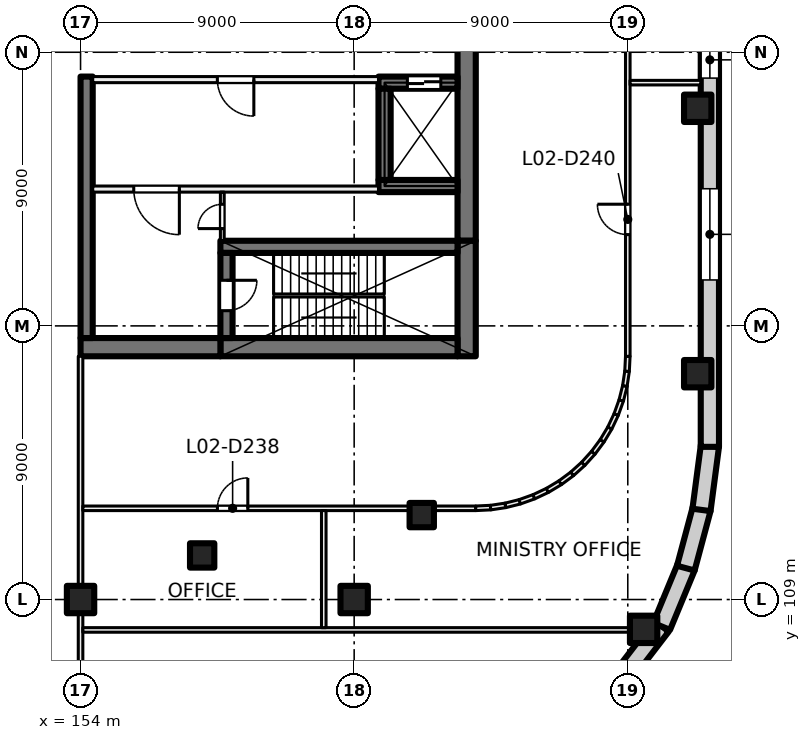
"""IFC4 building model, lengths in metres.
Left out: names, types, materials, properties, quantities, classifications, styles, units other than length and angle.
Written with IfcOpenShell. Run it as: python <this file> out.ifc"""

import sys

from ifc_helpers import new_model, si_unit, direction, frame, frame_2d, origin, origin_2d, place, context, subcontext, project, spatial, rectangle, extrude, element, fill, save


model = new_model("IFC4")
c1 = context("Model", 3, precision=1e-05, world=origin(), true_north=direction((0.0, 1.0)))
c2 = subcontext(c1, "Body", "Model", "MODEL_VIEW")
j1 = project(units=[si_unit("LENGTHUNIT", "METRE"), si_unit("PLANEANGLEUNIT", "RADIAN")], contexts=[c1])
p1 = place(None, origin())
s1 = spatial("IfcSite", under=j1, at=p1, CompositionType="ELEMENT")
p2 = place(p1, origin())
s2 = spatial("IfcBuilding", under=s1, at=p2, CompositionType="ELEMENT")
p3 = place(p2, frame((0.0, 0.0, 12.5)))
s3 = spatial("IfcBuildingStorey", under=s2, at=p3, CompositionType="ELEMENT", Elevation=12.5)
for number, where, z_axis, x_axis in (
    (1, (154.0, 109.0, 0.0), (0.0, 0.0, 1.0), (1.0, 0.0, 0.0)),
    (2, (163.0, 109.0, 0.0), (0.0, 0.0, 1.0), (1.0, 0.0, 0.0)),
    (3, (174.3, 125.157, 0.0), (0.0, 0.0, 1.0), (1.0, 0.0, 0.0)),
    (4, (174.3, 116.427, 0.0), (0.0, 0.0, 1.0), (1.0, 0.0, 0.0)),
    (5, (172.521, 108.019, 0.0), (0.0, 0.0, 1.0), (1.0, 0.0, 0.0)),
):
    element("IfcColumn", number, at=place(p3, frame(where, z_axis=z_axis, x_axis=x_axis)), inside=s3, PredefinedType="COLUMN", context=c2, shape_type="SweptSolid", body=[
        extrude(rectangle(XDim=0.9, YDim=0.9, at=origin_2d()), origin(), (0.0, 0.0, 1.0), 5.0),
    ])
for number, where, z_axis, x_axis in (
    (6, (165.223, 111.777, 0.0), (0.0, 0.0, 1.0), (1.0, 0.0, 0.0)),
    (7, (158.0, 110.45, 0.0), (0.0, 0.0, 1.0), (1.0, 0.0, 0.0)),
):
    element("IfcColumn", number, at=place(p3, frame(where, z_axis=z_axis, x_axis=x_axis)), inside=s3, PredefinedType="COLUMN", context=c2, shape_type="SweptSolid", body=[
        extrude(rectangle(XDim=0.8, YDim=0.8, at=origin_2d()), origin(), (0.0, 0.0, 1.0), 5.0),
    ])
p4 = place(p3, frame((166.7, 135.2, 0.0), z_axis=(0.0, 0.0, 1.0), x_axis=(0.0, -1.0, 0.0)))
e8 = element("IfcWall", 8, at=p4, inside=s3, PredefinedType="SHEAR", context=c2, shape_type="SweptSolid", body=[
    extrude(rectangle(XDim=14.4, YDim=0.6, at=frame_2d((7.2, 0.0))), origin(), (0.0, 0.0, 1.0), 5.0),
])
p5 = place(p3, frame((166.7, 120.8, 0.0), z_axis=(0.0, 0.0, 1.0), x_axis=(0.0, -1.0, 0.0)))
e9 = element("IfcWall", 9, at=p5, inside=s3, PredefinedType="SHEAR", context=c2, shape_type="SweptSolid", body=[
    extrude(rectangle(XDim=3.8, YDim=0.6, at=frame_2d((1.9, 0.0))), origin(), (0.0, 0.0, 1.0), 5.0),
])
p6 = place(p3, frame((166.4, 117.3, 0.0), z_axis=(0.0, 0.0, 1.0), x_axis=(-1.0, 0.0, 0.0)))
e10 = element("IfcWall", 10, at=p6, inside=s3, PredefinedType="SHEAR", context=c2, shape_type="SweptSolid", body=[
    extrude(rectangle(XDim=7.8, YDim=0.6, at=frame_2d((3.9, 0.0))), origin(), (0.0, 0.0, 1.0), 5.0),
])
p7 = place(p3, frame((158.6, 117.3, 0.0), z_axis=(0.0, 0.0, 1.0), x_axis=(-1.0, 0.0, 0.0)))
e11 = element("IfcWall", 11, at=p7, inside=s3, PredefinedType="SHEAR", context=c2, shape_type="SweptSolid", body=[
    extrude(rectangle(XDim=4.6, YDim=0.6, at=frame_2d((2.3, 0.0))), origin(), (0.0, 0.0, 1.0), 5.0),
])
p8 = place(p3, frame((166.4, 120.6, 0.0), z_axis=(0.0, 0.0, 1.0), x_axis=(-1.0, 0.0, 0.0)))
e12 = element("IfcWall", 12, at=p8, inside=s3, PredefinedType="SHEAR", context=c2, shape_type="SweptSolid", body=[
    extrude(rectangle(XDim=7.8, YDim=0.4, at=frame_2d((3.9, 0.0))), origin(), (0.0, 0.0, 1.0), 5.0),
])
p9 = place(p3, frame((158.8, 120.4, 0.0), z_axis=(0.0, 0.0, 1.0), x_axis=(0.0, -1.0, 0.0)))
e13 = element("IfcWall", 13, at=p9, inside=s3, PredefinedType="SHEAR", context=c2, shape_type="SweptSolid", body=[
    extrude(rectangle(XDim=2.8, YDim=0.4, at=frame_2d((1.4, 0.0))), origin(), (0.0, 0.0, 1.0), 5.0),
])
p10 = place(p9, frame((0.9, 0.0, 0.0)))
e14 = element("IfcOpeningElement", 14, at=p10, cuts=e13, PredefinedType="OPENING", context=c2, shape_type="SweptSolid", body=[
    extrude(rectangle(XDim=1.0, YDim=2.1, at=frame_2d((0.5, 1.05))), frame((0.0, 0.21, 0.0), z_axis=(0.0, -1.0, 0.0), x_axis=(1.0, 0.0, 0.0)), (0.0, 0.0, 1.0), 0.42),
])
p11 = place(p3, frame((166.4, 126.0, 0.0), z_axis=(0.0, 0.0, 1.0), x_axis=(-1.0, 0.0, 0.0)))
e15 = element("IfcWall", 15, at=p11, inside=s3, PredefinedType="SHEAR", context=c2, shape_type="SweptSolid", body=[
    extrude(rectangle(XDim=2.6, YDim=0.4, at=frame_2d((1.3, 0.0))), origin(), (0.0, 0.0, 1.0), 5.0),
])
p12 = place(p11, frame((0.55, 0.0, 0.0)))
e16 = element("IfcOpeningElement", 16, at=p12, cuts=e15, PredefinedType="OPENING", context=c2, shape_type="SweptSolid", body=[
    extrude(rectangle(XDim=1.1, YDim=2.1, at=frame_2d((0.55, 1.05))), frame((0.0, 0.21, 0.0), z_axis=(0.0, -1.0, 0.0), x_axis=(1.0, 0.0, 0.0)), (0.0, 0.0, 1.0), 0.42),
])
p13 = place(p3, frame((166.4, 122.6, 0.0), z_axis=(0.0, 0.0, 1.0), x_axis=(-1.0, 0.0, 0.0)))
e17 = element("IfcWall", 17, at=p13, inside=s3, PredefinedType="SHEAR", context=c2, shape_type="SweptSolid", body=[
    extrude(rectangle(XDim=2.6, YDim=0.4, at=frame_2d((1.3, 0.0))), origin(), (0.0, 0.0, 1.0), 5.0),
])
p14 = place(p3, frame((164.0, 125.8, 0.0), z_axis=(0.0, 0.0, 1.0), x_axis=(0.0, -1.0, 0.0)))
e18 = element("IfcWall", 18, at=p14, inside=s3, PredefinedType="SHEAR", context=c2, shape_type="SweptSolid", body=[
    extrude(rectangle(XDim=3.0, YDim=0.4, at=frame_2d((1.5, 0.0))), origin(), (0.0, 0.0, 1.0), 5.0),
])
p15 = place(p3, frame((154.2, 126.2, 0.0), z_axis=(0.0, 0.0, 1.0), x_axis=(0.0, -1.0, 0.0)))
e19 = element("IfcWall", 19, at=p15, inside=s3, PredefinedType="SHEAR", context=c2, shape_type="SweptSolid", body=[
    extrude(rectangle(XDim=8.6, YDim=0.4, at=frame_2d((4.3, 0.0))), origin(), (0.0, 0.0, 1.0), 5.0),
])
p16 = place(p3, frame((173.109, 108.128, 0.0), z_axis=(0.0, 0.0, 1.0), x_axis=(-0.609058260448, -0.793125485267, 0.0)))
e20 = element("IfcWall", 20, at=p16, inside=s3, PredefinedType="SOLIDWALL", context=c2, shape_type="SweptSolid", body=[
    extrude(rectangle(XDim=2.044, YDim=0.6, at=frame_2d((1.022, 0.0))), origin(), (0.0, 0.0, 1.0), 4.6),
])
p17 = place(p3, frame((173.921, 110.069, 0.0), z_axis=(0.0, 0.0, 1.0), x_axis=(-0.382375593358, -0.924006983526, 0.0)))
e21 = element("IfcWall", 21, at=p17, inside=s3, PredefinedType="SOLIDWALL", context=c2, shape_type="SweptSolid", body=[
    extrude(rectangle(XDim=2.114, YDim=0.6, at=frame_2d((1.057, 0.0))), origin(), (0.0, 0.0, 1.0), 4.6),
])
p18 = place(p3, frame((174.432, 111.986, 0.0), z_axis=(0.0, 0.0, 1.0), x_axis=(-0.258804467146, -0.965929732323, 0.0)))
e22 = element("IfcWall", 22, at=p18, inside=s3, PredefinedType="SOLIDWALL", context=c2, shape_type="SweptSolid", body=[
    extrude(rectangle(XDim=2.022, YDim=0.6, at=frame_2d((1.011, 0.0))), origin(), (0.0, 0.0, 1.0), 4.6),
])
p19 = place(p3, frame((174.703, 114.061, 0.0), z_axis=(0.0, 0.0, 1.0), x_axis=(-0.130558200013, -0.991440646942, 0.0)))
e23 = element("IfcWall", 23, at=p19, inside=s3, PredefinedType="SOLIDWALL", context=c2, shape_type="SweptSolid", body=[
    extrude(rectangle(XDim=2.132, YDim=0.6, at=frame_2d((1.066, 0.0))), origin(), (0.0, 0.0, 1.0), 4.6),
])
p20 = place(p3, frame((174.7, 141.978, 0.0), z_axis=(0.0, 0.0, 1.0), x_axis=(0.0, -1.0, 0.0)))
e24 = element("IfcWall", 24, at=p20, inside=s3, PredefinedType="SOLIDWALL", context=c2, shape_type="SweptSolid", body=[
    extrude(rectangle(XDim=27.957, YDim=0.6, at=frame_2d((13.978, 0.0))), origin(), (0.0, 0.0, 1.0), 4.6),
])
p21 = place(p20, frame((0.83, 0.0, 0.9)))
e25 = element("IfcOpeningElement", 25, at=p21, cuts=e24, PredefinedType="OPENING", context=c2, shape_type="SweptSolid", body=[
    extrude(rectangle(XDim=3.0, YDim=3.0, at=frame_2d((1.5, 1.5))), frame((0.0, 0.31, 0.0), z_axis=(0.0, -1.0, 0.0), x_axis=(1.0, 0.0, 0.0)), (0.0, 0.0, 1.0), 0.62),
])
p22 = place(p20, frame((10.148, 0.0, 0.9)))
e26 = element("IfcOpeningElement", 26, at=p22, cuts=e24, PredefinedType="OPENING", context=c2, shape_type="SweptSolid", body=[
    extrude(rectangle(XDim=3.0, YDim=3.0, at=frame_2d((1.5, 1.5))), frame((0.0, 0.31, 0.0), z_axis=(0.0, -1.0, 0.0), x_axis=(1.0, 0.0, 0.0)), (0.0, 0.0, 1.0), 0.62),
])
p23 = place(p20, frame((14.628, 0.0, 0.9)))
e27 = element("IfcOpeningElement", 27, at=p23, cuts=e24, PredefinedType="OPENING", context=c2, shape_type="SweptSolid", body=[
    extrude(rectangle(XDim=1.2, YDim=3.0, at=frame_2d((0.6, 1.5))), frame((0.0, 0.31, 0.0), z_axis=(0.0, -1.0, 0.0), x_axis=(1.0, 0.0, 0.0)), (0.0, 0.0, 1.0), 0.62),
])
p24 = place(p20, frame((19.467, 0.0, 0.9)))
e28 = element("IfcOpeningElement", 28, at=p24, cuts=e24, PredefinedType="OPENING", context=c2, shape_type="SweptSolid", body=[
    extrude(rectangle(XDim=3.0, YDim=3.0, at=frame_2d((1.5, 1.5))), frame((0.0, 0.31, 0.0), z_axis=(0.0, -1.0, 0.0), x_axis=(1.0, 0.0, 0.0)), (0.0, 0.0, 1.0), 0.62),
])
p25 = place(p3, frame((163.8, 126.1, 0.0), z_axis=(0.0, 0.0, 1.0), x_axis=(-1.0, 0.0, 0.0)))
e29 = element("IfcWall", 29, at=p25, inside=s3, PredefinedType="PARTITIONING", context=c2, shape_type="SweptSolid", body=[
    extrude(rectangle(XDim=9.4, YDim=0.2, at=frame_2d((4.7, 0.0))), origin(), (0.0, 0.0, 1.0), 4.6),
])
p26 = place(p25, frame((4.1, 0.0, 0.0)))
e30 = element("IfcOpeningElement", 30, at=p26, cuts=e29, PredefinedType="OPENING", context=c2, shape_type="SweptSolid", body=[
    extrude(rectangle(XDim=1.2, YDim=2.1, at=frame_2d((0.6, 1.05))), frame((0.0, 0.11, 0.0), z_axis=(0.0, -1.0, 0.0), x_axis=(1.0, 0.0, 0.0)), (0.0, 0.0, 1.0), 0.22),
])
p27 = place(p3, frame((163.8, 122.5, 0.0), z_axis=(0.0, 0.0, 1.0), x_axis=(-1.0, 0.0, 0.0)))
e31 = element("IfcWall", 31, at=p27, inside=s3, PredefinedType="PARTITIONING", context=c2, shape_type="SweptSolid", body=[
    extrude(rectangle(XDim=9.4, YDim=0.2, at=frame_2d((4.7, 0.0))), origin(), (0.0, 0.0, 1.0), 4.6),
])
p28 = place(p27, frame((6.55, 0.0, 0.0)))
e32 = element("IfcOpeningElement", 32, at=p28, cuts=e31, PredefinedType="OPENING", context=c2, shape_type="SweptSolid", body=[
    extrude(rectangle(XDim=1.5, YDim=2.1, at=frame_2d((0.75, 1.05))), frame((0.0, 0.11, 0.0), z_axis=(0.0, -1.0, 0.0), x_axis=(1.0, 0.0, 0.0)), (0.0, 0.0, 1.0), 0.22),
])
p29 = place(p3, frame((158.663, 120.8, 0.0), z_axis=(0.0, 0.0, 1.0), x_axis=(0.0, 1.0, 0.0)))
e33 = element("IfcWall", 33, at=p29, inside=s3, PredefinedType="PARTITIONING", context=c2, shape_type="SweptSolid", body=[
    extrude(rectangle(XDim=1.6, YDim=0.125, at=frame_2d((0.8, 0.0))), origin(), (0.0, 0.0, 1.0), 4.6),
])
p30 = place(p29, frame((0.4, 0.0, 0.0)))
e34 = element("IfcOpeningElement", 34, at=p30, cuts=e33, PredefinedType="OPENING", context=c2, shape_type="SweptSolid", body=[
    extrude(rectangle(XDim=0.8, YDim=2.1, at=frame_2d((0.4, 1.05))), frame((0.0, 0.073, 0.0), z_axis=(0.0, -1.0, 0.0), x_axis=(1.0, 0.0, 0.0)), (0.0, 0.0, 1.0), 0.145),
])
p31 = place(p3, frame((154.0, 103.075, 0.0), z_axis=(0.0, 0.0, 1.0), x_axis=(0.0, 1.0, 0.0)))
e35 = element("IfcWall", 35, at=p31, inside=s3, PredefinedType="PARTITIONING", context=c2, shape_type="SweptSolid", body=[
    extrude(rectangle(XDim=13.925, YDim=0.15, at=frame_2d((6.962, 0.0))), origin(), (0.0, 0.0, 1.0), 4.6),
])
p32 = place(p3, frame((154.075, 108.0, 0.0), z_axis=(0.0, 0.0, 1.0), x_axis=(1.0, 0.0, 0.0)))
e36 = element("IfcWall", 36, at=p32, inside=s3, PredefinedType="PARTITIONING", context=c2, shape_type="SweptSolid", body=[
    extrude(rectangle(XDim=18.557, YDim=0.15, at=frame_2d((9.279, 0.0))), origin(), (0.0, 0.0, 1.0), 4.6),
])
p33 = place(p3, frame((167.002, 112.0, 0.0), z_axis=(0.0, 0.0, 1.0), x_axis=(-1.0, 0.0, 0.0)))
e37 = element("IfcWall", 37, at=p33, inside=s3, PredefinedType="PARTITIONING", context=c2, shape_type="SweptSolid", body=[
    extrude(rectangle(XDim=12.927, YDim=0.15, at=frame_2d((6.463, 0.0))), origin(), (0.0, 0.0, 1.0), 4.6),
])
p34 = place(p33, frame((7.5, 0.0, 0.0)))
e38 = element("IfcOpeningElement", 38, at=p34, cuts=e37, PredefinedType="OPENING", context=c2, shape_type="SweptSolid", body=[
    extrude(rectangle(XDim=1.0, YDim=2.1, at=frame_2d((0.5, 1.05))), frame((0.0, 0.085, 0.0), z_axis=(0.0, -1.0, 0.0), x_axis=(1.0, 0.0, 0.0)), (0.0, 0.0, 1.0), 0.17),
])
p35 = place(p3, frame((162.0, 108.075, 0.0), z_axis=(0.0, 0.0, 1.0), x_axis=(0.0, 1.0, 0.0)))
e39 = element("IfcWall", 39, at=p35, inside=s3, PredefinedType="PARTITIONING", context=c2, shape_type="SweptSolid", body=[
    extrude(rectangle(XDim=3.85, YDim=0.15, at=frame_2d((1.925, 0.0))), origin(), (0.0, 0.0, 1.0), 4.6),
])
p36 = place(p3, frame((166.998, 112.0, 0.0), z_axis=(0.0, 0.0, 1.0), x_axis=(0.998837896651, 0.048196018647, 0.0)))
e40 = element("IfcWall", 40, at=p36, inside=s3, PredefinedType="PARTITIONING", context=c2, shape_type="SweptSolid", body=[
    extrude(rectangle(XDim=0.496, YDim=0.15, at=frame_2d((0.248, 0.0))), origin(), (0.0, 0.0, 1.0), 4.6),
])
p37 = place(p3, frame((167.486, 112.023, 0.0), z_axis=(0.0, 0.0, 1.0), x_axis=(0.988925572052, 0.148412307247, 0.0)))
e41 = element("IfcWall", 41, at=p37, inside=s3, PredefinedType="PARTITIONING", context=c2, shape_type="SweptSolid", body=[
    extrude(rectangle(XDim=0.499, YDim=0.15, at=frame_2d((0.249, 0.0))), origin(), (0.0, 0.0, 1.0), 4.6),
])
p38 = place(p3, frame((167.971, 112.095, 0.0), z_axis=(0.0, 0.0, 1.0), x_axis=(0.970113715952, 0.242650732785, 0.0)))
e42 = element("IfcWall", 42, at=p38, inside=s3, PredefinedType="PARTITIONING", context=c2, shape_type="SweptSolid", body=[
    extrude(rectangle(XDim=0.499, YDim=0.15, at=frame_2d((0.25, 0.0))), origin(), (0.0, 0.0, 1.0), 4.6),
])
for number, where, z_axis, x_axis in (
    (43, (168.447, 112.214, 0.0), (0.0, 0.0, 1.0), (0.941, 0.337, 0.0)),
    (44, (168.91, 112.379, 0.0), (0.0, 0.0, 1.0), (0.904, 0.428, 0.0)),
):
    element("IfcWall", number, at=place(p3, frame(where, z_axis=z_axis, x_axis=x_axis)), inside=s3, PredefinedType="PARTITIONING", context=c2, shape_type="SweptSolid", body=[
        extrude(rectangle(XDim=0.498, YDim=0.15, at=frame_2d((0.249, 0.0))), origin(), (0.0, 0.0, 1.0), 4.6),
    ])
p39 = place(p3, frame((169.354, 112.588, 0.0), z_axis=(0.0, 0.0, 1.0), x_axis=(0.85671397893, 0.515791778052, 0.0)))
e45 = element("IfcWall", 45, at=p39, inside=s3, PredefinedType="PARTITIONING", context=c2, shape_type="SweptSolid", body=[
    extrude(rectangle(XDim=0.499, YDim=0.15, at=frame_2d((0.249, 0.0))), origin(), (0.0, 0.0, 1.0), 4.6),
])
p40 = place(p3, frame((169.775, 112.841, 0.0), z_axis=(0.0, 0.0, 1.0), x_axis=(0.80404358372, 0.594570362092, 0.0)))
e46 = element("IfcWall", 46, at=p40, inside=s3, PredefinedType="PARTITIONING", context=c2, shape_type="SweptSolid", body=[
    extrude(rectangle(XDim=0.498, YDim=0.15, at=frame_2d((0.249, 0.0))), origin(), (0.0, 0.0, 1.0), 4.6),
])
for number, where, z_axis, x_axis in (
    (47, (170.169, 113.133, 0.0), (0.0, 0.0, 1.0), (0.742, 0.67, 0.0)),
    (48, (170.533, 113.461, 0.0), (0.0, 0.0, 1.0), (0.67, 0.742, 0.0)),
):
    element("IfcWall", number, at=place(p3, frame(where, z_axis=z_axis, x_axis=x_axis)), inside=s3, PredefinedType="PARTITIONING", context=c2, shape_type="SweptSolid", body=[
        extrude(rectangle(XDim=0.499, YDim=0.15, at=frame_2d((0.249, 0.0))), origin(), (0.0, 0.0, 1.0), 4.6),
    ])
p41 = place(p3, frame((170.863, 113.825, 0.0), z_axis=(0.0, 0.0, 1.0), x_axis=(0.594570362092, 0.80404358372, 0.0)))
e49 = element("IfcWall", 49, at=p41, inside=s3, PredefinedType="PARTITIONING", context=c2, shape_type="SweptSolid", body=[
    extrude(rectangle(XDim=0.498, YDim=0.15, at=frame_2d((0.249, 0.0))), origin(), (0.0, 0.0, 1.0), 4.6),
])
p42 = place(p3, frame((171.155, 114.219, 0.0), z_axis=(0.0, 0.0, 1.0), x_axis=(0.515791778052, 0.85671397893, 0.0)))
e50 = element("IfcWall", 50, at=p42, inside=s3, PredefinedType="PARTITIONING", context=c2, shape_type="SweptSolid", body=[
    extrude(rectangle(XDim=0.499, YDim=0.15, at=frame_2d((0.249, 0.0))), origin(), (0.0, 0.0, 1.0), 4.6),
])
for number, where, z_axis, x_axis in (
    (51, (171.408, 114.64, 0.0), (0.0, 0.0, 1.0), (0.428, 0.904, 0.0)),
    (52, (171.618, 115.084, 0.0), (0.0, 0.0, 1.0), (0.337, 0.941, 0.0)),
):
    element("IfcWall", number, at=place(p3, frame(where, z_axis=z_axis, x_axis=x_axis)), inside=s3, PredefinedType="PARTITIONING", context=c2, shape_type="SweptSolid", body=[
        extrude(rectangle(XDim=0.498, YDim=0.15, at=frame_2d((0.249, 0.0))), origin(), (0.0, 0.0, 1.0), 4.6),
    ])
p43 = place(p3, frame((171.784, 115.545, 0.0), z_axis=(0.0, 0.0, 1.0), x_axis=(0.242650732785, 0.970113715952, 0.0)))
e53 = element("IfcWall", 53, at=p43, inside=s3, PredefinedType="PARTITIONING", context=c2, shape_type="SweptSolid", body=[
    extrude(rectangle(XDim=0.499, YDim=0.15, at=frame_2d((0.25, 0.0))), origin(), (0.0, 0.0, 1.0), 4.6),
])
p44 = place(p3, frame((171.903, 116.021, 0.0), z_axis=(0.0, 0.0, 1.0), x_axis=(0.148412307247, 0.988925572052, 0.0)))
e54 = element("IfcWall", 54, at=p44, inside=s3, PredefinedType="PARTITIONING", context=c2, shape_type="SweptSolid", body=[
    extrude(rectangle(XDim=0.499, YDim=0.15, at=frame_2d((0.249, 0.0))), origin(), (0.0, 0.0, 1.0), 4.6),
])
p45 = place(p3, frame((171.976, 116.506, 0.0), z_axis=(0.0, 0.0, 1.0), x_axis=(0.048196018647, 0.998837896651, 0.0)))
e55 = element("IfcWall", 55, at=p45, inside=s3, PredefinedType="PARTITIONING", context=c2, shape_type="SweptSolid", body=[
    extrude(rectangle(XDim=0.496, YDim=0.15, at=frame_2d((0.248, 0.0))), origin(), (0.0, 0.0, 1.0), 4.6),
])
p46 = place(p3, frame((172.0, 139.002, 0.0), z_axis=(0.0, 0.0, 1.0), x_axis=(0.0, -1.0, 0.0)))
e56 = element("IfcWall", 56, at=p46, inside=s3, PredefinedType="PARTITIONING", context=c2, shape_type="SweptSolid", body=[
    extrude(rectangle(XDim=22.004, YDim=0.15, at=frame_2d((11.002, 0.0))), origin(), (0.0, 0.0, 1.0), 4.6),
])
p47 = place(p46, frame((17.0, 0.0, 0.0)))
e57 = element("IfcOpeningElement", 57, at=p47, cuts=e56, PredefinedType="OPENING", context=c2, shape_type="SweptSolid", body=[
    extrude(rectangle(XDim=1.0, YDim=2.1, at=frame_2d((0.5, 1.05))), frame((0.0, 0.085, 0.0), z_axis=(0.0, -1.0, 0.0), x_axis=(1.0, 0.0, 0.0)), (0.0, 0.0, 1.0), 0.17),
])
p48 = place(p46, frame((6.004, 0.0, 0.0)))
e58 = element("IfcOpeningElement", 58, at=p48, cuts=e56, PredefinedType="OPENING", context=c2, shape_type="SweptSolid", body=[
    extrude(rectangle(XDim=1.0, YDim=2.1, at=frame_2d((0.5, 1.05))), frame((0.0, 0.085, 0.0), z_axis=(0.0, -1.0, 0.0), x_axis=(1.0, 0.0, 0.0)), (0.0, 0.0, 1.0), 0.17),
])
p49 = place(p3, frame((172.075, 126.0, 0.0), z_axis=(0.0, 0.0, 1.0), x_axis=(1.0, 0.0, 0.0)))
e59 = element("IfcWall", 59, at=p49, inside=s3, PredefinedType="PARTITIONING", context=c2, shape_type="SweptSolid", body=[
    extrude(rectangle(XDim=2.325, YDim=0.15, at=frame_2d((1.163, 0.0))), origin(), (0.0, 0.0, 1.0), 4.6),
])
p50 = place(p23, origin())
e60 = element("IfcWindow", 60, at=p50, inside=s3, PartitioningType="SINGLE_PANEL", PredefinedType="WINDOW", context=c2, shape_type="SweptSolid", body=[
    extrude(rectangle(XDim=1.2, YDim=3.0, at=frame_2d((0.6, 1.5))), frame((0.0, 0.03, 0.0), z_axis=(0.0, -1.0, 0.0), x_axis=(1.0, 0.0, 0.0)), (0.0, 0.0, 1.0), 0.06),
])
fill(e27, e60)
p51 = place(p24, origin())
e61 = element("IfcWindow", 61, at=p51, inside=s3, PartitioningType="SINGLE_PANEL", PredefinedType="WINDOW", context=c2, shape_type="SweptSolid", body=[
    extrude(rectangle(XDim=3.0, YDim=3.0, at=frame_2d((1.5, 1.5))), frame((0.0, 0.03, 0.0), z_axis=(0.0, -1.0, 0.0), x_axis=(1.0, 0.0, 0.0)), (0.0, 0.0, 1.0), 0.06),
])
fill(e28, e61)
p52 = place(p12, origin())
e62 = element("IfcDoor", 62, at=p52, inside=s3, OperationType="DOUBLE_DOOR_SLIDING", PredefinedType="DOOR", context=c2, shape_type="SweptSolid", body=[
    extrude(rectangle(XDim=1.1, YDim=2.1, at=frame_2d((0.55, 1.05))), frame((0.0, 0.025, 0.0), z_axis=(0.0, -1.0, 0.0), x_axis=(1.0, 0.0, 0.0)), (0.0, 0.0, 1.0), 0.05),
])
fill(e16, e62)
p53 = place(p26, origin())
e63 = element("IfcDoor", 63, at=p53, inside=s3, OperationType="DOUBLE_DOOR_SINGLE_SWING", PredefinedType="DOOR", context=c2, shape_type="SweptSolid", body=[
    extrude(rectangle(XDim=1.2, YDim=2.1, at=frame_2d((0.6, 1.05))), frame((0.0, 0.025, 0.0), z_axis=(0.0, -1.0, 0.0), x_axis=(1.0, 0.0, 0.0)), (0.0, 0.0, 1.0), 0.05),
])
fill(e30, e63)
p54 = place(p28, origin())
e64 = element("IfcDoor", 64, at=p54, inside=s3, OperationType="DOUBLE_DOOR_SINGLE_SWING", PredefinedType="DOOR", context=c2, shape_type="SweptSolid", body=[
    extrude(rectangle(XDim=1.5, YDim=2.1, at=frame_2d((0.75, 1.05))), frame((0.0, 0.025, 0.0), z_axis=(0.0, -1.0, 0.0), x_axis=(1.0, 0.0, 0.0)), (0.0, 0.0, 1.0), 0.05),
])
fill(e32, e64)
p55 = place(p10, origin())
e65 = element("IfcDoor", 65, at=p55, inside=s3, OperationType="SINGLE_SWING_LEFT", PredefinedType="DOOR", context=c2, shape_type="SweptSolid", body=[
    extrude(rectangle(XDim=1.0, YDim=2.1, at=frame_2d((0.5, 1.05))), frame((0.0, 0.025, 0.0), z_axis=(0.0, -1.0, 0.0), x_axis=(1.0, 0.0, 0.0)), (0.0, 0.0, 1.0), 0.05),
])
fill(e14, e65)
p56 = place(p30, origin())
e66 = element("IfcDoor", 66, at=p56, inside=s3, OperationType="SINGLE_SWING_RIGHT", PredefinedType="DOOR", context=c2, shape_type="SweptSolid", body=[
    extrude(rectangle(XDim=0.8, YDim=2.1, at=frame_2d((0.4, 1.05))), frame((0.0, 0.025, 0.0), z_axis=(0.0, -1.0, 0.0), x_axis=(1.0, 0.0, 0.0)), (0.0, 0.0, 1.0), 0.05),
])
fill(e34, e66)
p57 = place(p34, origin())
e67 = element("IfcDoor", 67, at=p57, inside=s3, OperationType="SINGLE_SWING_LEFT", PredefinedType="DOOR", context=c2, shape_type="SweptSolid", body=[
    extrude(rectangle(XDim=1.0, YDim=2.1, at=frame_2d((0.5, 1.05))), frame((0.0, 0.025, 0.0), z_axis=(0.0, -1.0, 0.0), x_axis=(1.0, 0.0, 0.0)), (0.0, 0.0, 1.0), 0.05),
])
fill(e38, e67)
p58 = place(p47, origin())
e68 = element("IfcDoor", 68, at=p58, inside=s3, OperationType="SINGLE_SWING_LEFT", PredefinedType="DOOR", context=c2, shape_type="SweptSolid", body=[
    extrude(rectangle(XDim=1.0, YDim=2.1, at=frame_2d((0.5, 1.05))), frame((0.0, 0.025, 0.0), z_axis=(0.0, -1.0, 0.0), x_axis=(1.0, 0.0, 0.0)), (0.0, 0.0, 1.0), 0.05),
])
fill(e57, e68)
save(model, sys.argv[1])
